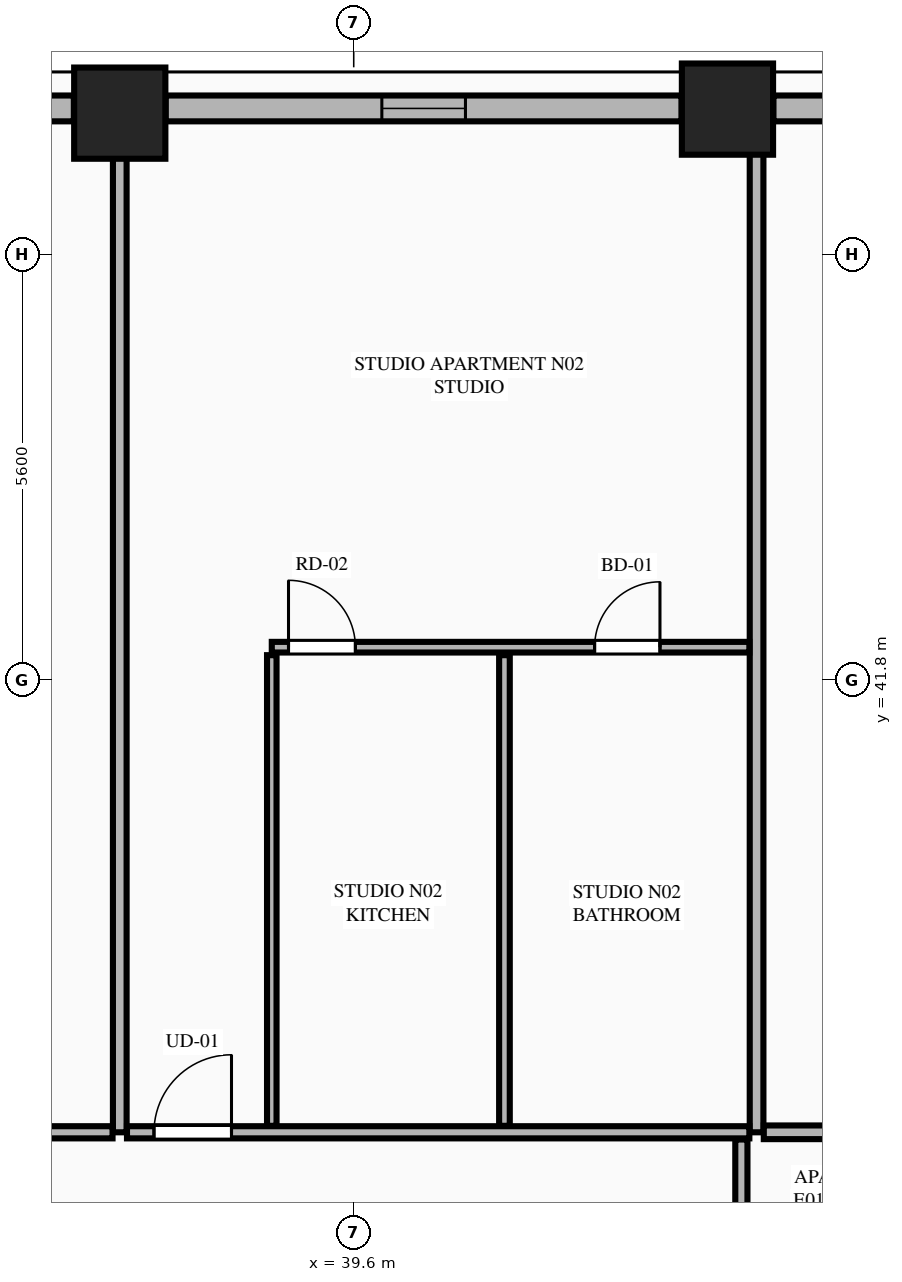
"""IFC4 building model, lengths in metres.
Left out: names, types, materials, properties, quantities, classifications, styles, units other than length and angle.
Written with IfcOpenShell. Run it as: python <this file> out.ifc"""

import sys

from ifc_helpers import new_model, si_unit, direction, frame, frame_2d, origin, origin_2d, place, context, subcontext, project, spatial, rectangle, extrude, element, fill, save


model = new_model("IFC4")
c1 = context("Model", 3, precision=1e-05, world=origin(), true_north=direction((0.0, 1.0)))
c2 = subcontext(c1, "Body", "Model", "MODEL_VIEW")
j1 = project(units=[si_unit("LENGTHUNIT", "METRE"), si_unit("PLANEANGLEUNIT", "RADIAN")], contexts=[c1])
p1 = place(None, origin())
s1 = spatial("IfcSite", under=j1, at=p1, CompositionType="ELEMENT")
p2 = place(p1, origin())
s2 = spatial("IfcBuilding", under=s1, at=p2, CompositionType="ELEMENT")
p3 = place(p2, frame((0.0, 0.0, 35.55)))
s3 = spatial("IfcBuildingStorey", under=s2, at=p3, CompositionType="ELEMENT", Elevation=35.55)
for number, where, z_axis, x_axis in (
    (1, (44.517, 49.311, 0.0), (0.0, 0.0, 1.0), (1.0, 0.0, 0.0)),
    (2, (36.522, 49.258, 0.0), (0.0, 0.0, 1.0), (1.0, 0.0, 0.0)),
):
    element("IfcColumn", number, at=place(p3, frame(where, z_axis=z_axis, x_axis=x_axis)), inside=s3, PredefinedType="COLUMN", context=c2, shape_type="SweptSolid", body=[
        extrude(rectangle(XDim=1.2, YDim=1.2, at=origin_2d()), origin(), (0.0, 0.0, 1.0), 3.55),
    ])
p4 = place(p3, frame((46.366, 49.32, 0.0), z_axis=(0.0, 0.0, 1.0), x_axis=(-1.0, 0.0, 0.0)))
e3 = element("IfcWall", 3, at=p4, inside=s3, PredefinedType="STANDARD", context=c2, shape_type="SweptSolid", body=[
    extrude(rectangle(XDim=1.245, YDim=0.34, at=frame_2d((0.623, 0.0))), origin(), (0.0, 0.0, 1.0), 3.33),
])
p5 = place(p3, frame((43.913, 49.32, 0.0), z_axis=(0.0, 0.0, 1.0), x_axis=(-1.0, 0.0, 0.0)))
e4 = element("IfcWall", 4, at=p5, inside=s3, PredefinedType="STANDARD", context=c2, shape_type="SweptSolid", body=[
    extrude(rectangle(XDim=6.787, YDim=0.34, at=frame_2d((3.394, 0.0))), origin(), (0.0, 0.0, 1.0), 2.787),
])
p6 = place(p5, frame((2.843, 0.0, 0.75)))
e5 = element("IfcOpeningElement", 5, at=p6, cuts=e4, PredefinedType="OPENING", context=c2, shape_type="SweptSolid", body=[
    extrude(rectangle(XDim=1.1, YDim=1.887, at=frame_2d((0.55, 0.943))), frame((0.0, 0.18, 0.0), z_axis=(0.0, -1.0, 0.0), x_axis=(1.0, 0.0, 0.0)), (0.0, 0.0, 1.0), 0.36),
])
p7 = place(p3, frame((35.918, 49.32, 0.0), z_axis=(0.0, 0.0, 1.0), x_axis=(-1.0, 0.0, 0.0)))
e6 = element("IfcWall", 6, at=p7, inside=s3, PredefinedType="STANDARD", context=c2, shape_type="SweptSolid", body=[
    extrude(rectangle(XDim=7.036, YDim=0.34, at=frame_2d((3.518, 0.0))), origin(), (0.0, 0.0, 1.0), 2.787),
])
p8 = place(p7, frame((2.968, 0.0, 0.75)))
e7 = element("IfcOpeningElement", 7, at=p8, cuts=e6, PredefinedType="OPENING", context=c2, shape_type="SweptSolid", body=[
    extrude(rectangle(XDim=1.1, YDim=1.887, at=frame_2d((0.55, 0.943))), frame((0.0, 0.18, 0.0), z_axis=(0.0, -1.0, 0.0), x_axis=(1.0, 0.0, 0.0)), (0.0, 0.0, 1.0), 0.36),
])
p9 = place(p3, frame((36.522, 35.85, 0.0), z_axis=(0.0, 0.0, 1.0), x_axis=(0.0, 1.0, 0.0)))
e8 = element("IfcWall", 8, at=p9, inside=s3, PredefinedType="PARTITIONING", context=c2, shape_type="SweptSolid", body=[
    extrude(rectangle(XDim=13.295, YDim=0.18, at=frame_2d((6.647, 0.0))), origin(), (0.0, 0.0, 1.0), 2.7),
])
p10 = place(p3, frame((44.9, 35.85, 0.0), z_axis=(0.0, 0.0, 1.0), x_axis=(0.0, 1.0, 0.0)))
e9 = element("IfcWall", 9, at=p10, inside=s3, PredefinedType="PARTITIONING", context=c2, shape_type="SweptSolid", body=[
    extrude(rectangle(XDim=13.295, YDim=0.18, at=frame_2d((6.647, 0.0))), origin(), (0.0, 0.0, 1.0), 3.33),
])
p11 = place(p3, frame((19.995, 35.85, 0.0), z_axis=(0.0, 0.0, 1.0), x_axis=(1.0, 0.0, 0.0)))
e10 = element("IfcWall", 10, at=p11, inside=s3, PredefinedType="PARTITIONING", context=c2, shape_type="SweptSolid", body=[
    extrude(rectangle(XDim=16.432, YDim=0.16, at=frame_2d((8.216, 0.0))), origin(), (0.0, 0.0, 1.0), 3.33),
])
p12 = place(p11, frame((14.577, 0.0, 0.0)))
e11 = element("IfcOpeningElement", 11, at=p12, cuts=e10, PredefinedType="OPENING", context=c2, shape_type="SweptSolid", body=[
    extrude(rectangle(XDim=1.02, YDim=2.25, at=frame_2d((0.51, 1.125))), frame((0.0, 0.09, 0.0), z_axis=(0.0, -1.0, 0.0), x_axis=(1.0, 0.0, 0.0)), (0.0, 0.0, 1.0), 0.18),
])
p13 = place(p3, frame((36.617, 35.85, 0.0), z_axis=(0.0, 0.0, 1.0), x_axis=(1.0, 0.0, 0.0)))
e12 = element("IfcWall", 12, at=p13, inside=s3, PredefinedType="PARTITIONING", context=c2, shape_type="SweptSolid", body=[
    extrude(rectangle(XDim=8.188, YDim=0.16, at=frame_2d((4.094, 0.0))), origin(), (0.0, 0.0, 1.0), 3.33),
])
p14 = place(p13, frame((0.355, 0.0, 0.0)))
e13 = element("IfcOpeningElement", 13, at=p14, cuts=e12, PredefinedType="OPENING", context=c2, shape_type="SweptSolid", body=[
    extrude(rectangle(XDim=1.02, YDim=2.25, at=frame_2d((0.51, 1.125))), frame((0.0, 0.09, 0.0), z_axis=(0.0, -1.0, 0.0), x_axis=(1.0, 0.0, 0.0)), (0.0, 0.0, 1.0), 0.18),
])
p15 = place(p3, frame((38.522, 35.935, 0.0), z_axis=(0.0, 0.0, 1.0), x_axis=(0.0, 1.0, 0.0)))
e14 = element("IfcWall", 14, at=p15, inside=s3, PredefinedType="PARTITIONING", context=c2, shape_type="SweptSolid", body=[
    extrude(rectangle(XDim=6.192, YDim=0.125, at=frame_2d((3.096, 0.0))), origin(), (0.0, 0.0, 1.0), 3.33),
])
p16 = place(p3, frame((38.522, 42.232, 0.0), z_axis=(0.0, 0.0, 1.0), x_axis=(1.0, 0.0, 0.0)))
e15 = element("IfcWall", 15, at=p16, inside=s3, PredefinedType="PLUMBINGWALL", context=c2, shape_type="SweptSolid", body=[
    extrude(rectangle(XDim=6.283, YDim=0.14, at=frame_2d((3.142, 0.0))), origin(), (0.0, 0.0, 1.0), 3.33),
])
p17 = place(p16, frame((4.247, 0.0, 0.0)))
e16 = element("IfcOpeningElement", 16, at=p17, cuts=e15, PredefinedType="OPENING", context=c2, shape_type="SweptSolid", body=[
    extrude(rectangle(XDim=0.86, YDim=2.1, at=frame_2d((0.43, 1.05))), frame((0.0, 0.08, 0.0), z_axis=(0.0, -1.0, 0.0), x_axis=(1.0, 0.0, 0.0)), (0.0, 0.0, 1.0), 0.16),
])
p18 = place(p16, frame((0.22, 0.0, 0.0)))
e17 = element("IfcOpeningElement", 17, at=p18, cuts=e15, PredefinedType="OPENING", context=c2, shape_type="SweptSolid", body=[
    extrude(rectangle(XDim=0.88, YDim=2.15, at=frame_2d((0.44, 1.075))), frame((0.0, 0.08, 0.0), z_axis=(0.0, -1.0, 0.0), x_axis=(1.0, 0.0, 0.0)), (0.0, 0.0, 1.0), 0.16),
])
p19 = place(p3, frame((41.583, 35.935, 0.0), z_axis=(0.0, 0.0, 1.0), x_axis=(0.0, 1.0, 0.0)))
e18 = element("IfcWall", 18, at=p19, inside=s3, PredefinedType="PLUMBINGWALL", context=c2, shape_type="SweptSolid", body=[
    extrude(rectangle(XDim=6.192, YDim=0.14, at=frame_2d((3.096, 0.0))), origin(), (0.0, 0.0, 1.0), 3.33),
])
p20 = place(p3, frame((44.995, 35.85, 0.0), z_axis=(0.0, 0.0, 1.0), x_axis=(1.0, 0.0, 0.0)))
e19 = element("IfcWall", 19, at=p20, inside=s3, PredefinedType="PARTITIONING", context=c2, shape_type="SweptSolid", body=[
    extrude(rectangle(XDim=9.14, YDim=0.18, at=frame_2d((4.57, 0.0))), origin(), (0.0, 0.0, 1.0), 3.33),
])
p21 = place(p3, frame((44.7, 16.045, 0.0), z_axis=(0.0, 0.0, 1.0), x_axis=(0.0, 1.0, 0.0)))
e20 = element("IfcWall", 20, at=p21, inside=s3, PredefinedType="PARTITIONING", context=c2, shape_type="SweptSolid", body=[
    extrude(rectangle(XDim=19.71, YDim=0.16, at=frame_2d((9.855, 0.0))), origin(), (0.0, 0.0, 1.0), 2.7),
])
p22 = place(p21, frame((0.45, 0.0, 0.0)))
e21 = element("IfcOpeningElement", 21, at=p22, cuts=e20, PredefinedType="OPENING", context=c2, shape_type="SweptSolid", body=[
    extrude(rectangle(XDim=1.02, YDim=2.25, at=frame_2d((0.51, 1.125))), frame((0.0, 0.09, 0.0), z_axis=(0.0, -1.0, 0.0), x_axis=(1.0, 0.0, 0.0)), (0.0, 0.0, 1.0), 0.18),
])
p23 = place(p6, origin())
e22 = element("IfcWindow", 22, at=p23, inside=s3, PartitioningType="SINGLE_PANEL", PredefinedType="WINDOW", context=c2, shape_type="SweptSolid", body=[
    extrude(rectangle(XDim=1.1, YDim=1.887, at=frame_2d((0.55, 0.943))), frame((0.0, 0.03, 0.0), z_axis=(0.0, -1.0, 0.0), x_axis=(1.0, 0.0, 0.0)), (0.0, 0.0, 1.0), 0.06),
])
fill(e5, e22)
p24 = place(p17, origin())
e23 = element("IfcDoor", 23, at=p24, inside=s3, OperationType="SINGLE_SWING_RIGHT", PredefinedType="DOOR", context=c2, shape_type="SweptSolid", body=[
    extrude(rectangle(XDim=0.86, YDim=2.1, at=frame_2d((0.43, 1.05))), frame((0.0, 0.025, 0.0), z_axis=(0.0, -1.0, 0.0), x_axis=(1.0, 0.0, 0.0)), (0.0, 0.0, 1.0), 0.05),
])
fill(e16, e23)
p25 = place(p14, origin())
e24 = element("IfcDoor", 24, at=p25, inside=s3, OperationType="SINGLE_SWING_RIGHT", PredefinedType="DOOR", context=c2, shape_type="SweptSolid", body=[
    extrude(rectangle(XDim=1.02, YDim=2.25, at=frame_2d((0.51, 1.125))), frame((0.0, 0.025, 0.0), z_axis=(0.0, -1.0, 0.0), x_axis=(1.0, 0.0, 0.0)), (0.0, 0.0, 1.0), 0.05),
])
fill(e13, e24)
p26 = place(p18, origin())
e25 = element("IfcDoor", 25, at=p26, inside=s3, OperationType="SINGLE_SWING_LEFT", PredefinedType="DOOR", context=c2, shape_type="SweptSolid", body=[
    extrude(rectangle(XDim=0.88, YDim=2.15, at=frame_2d((0.44, 1.075))), frame((0.0, 0.025, 0.0), z_axis=(0.0, -1.0, 0.0), x_axis=(1.0, 0.0, 0.0)), (0.0, 0.0, 1.0), 0.05),
])
fill(e17, e25)
save(model, sys.argv[1])
